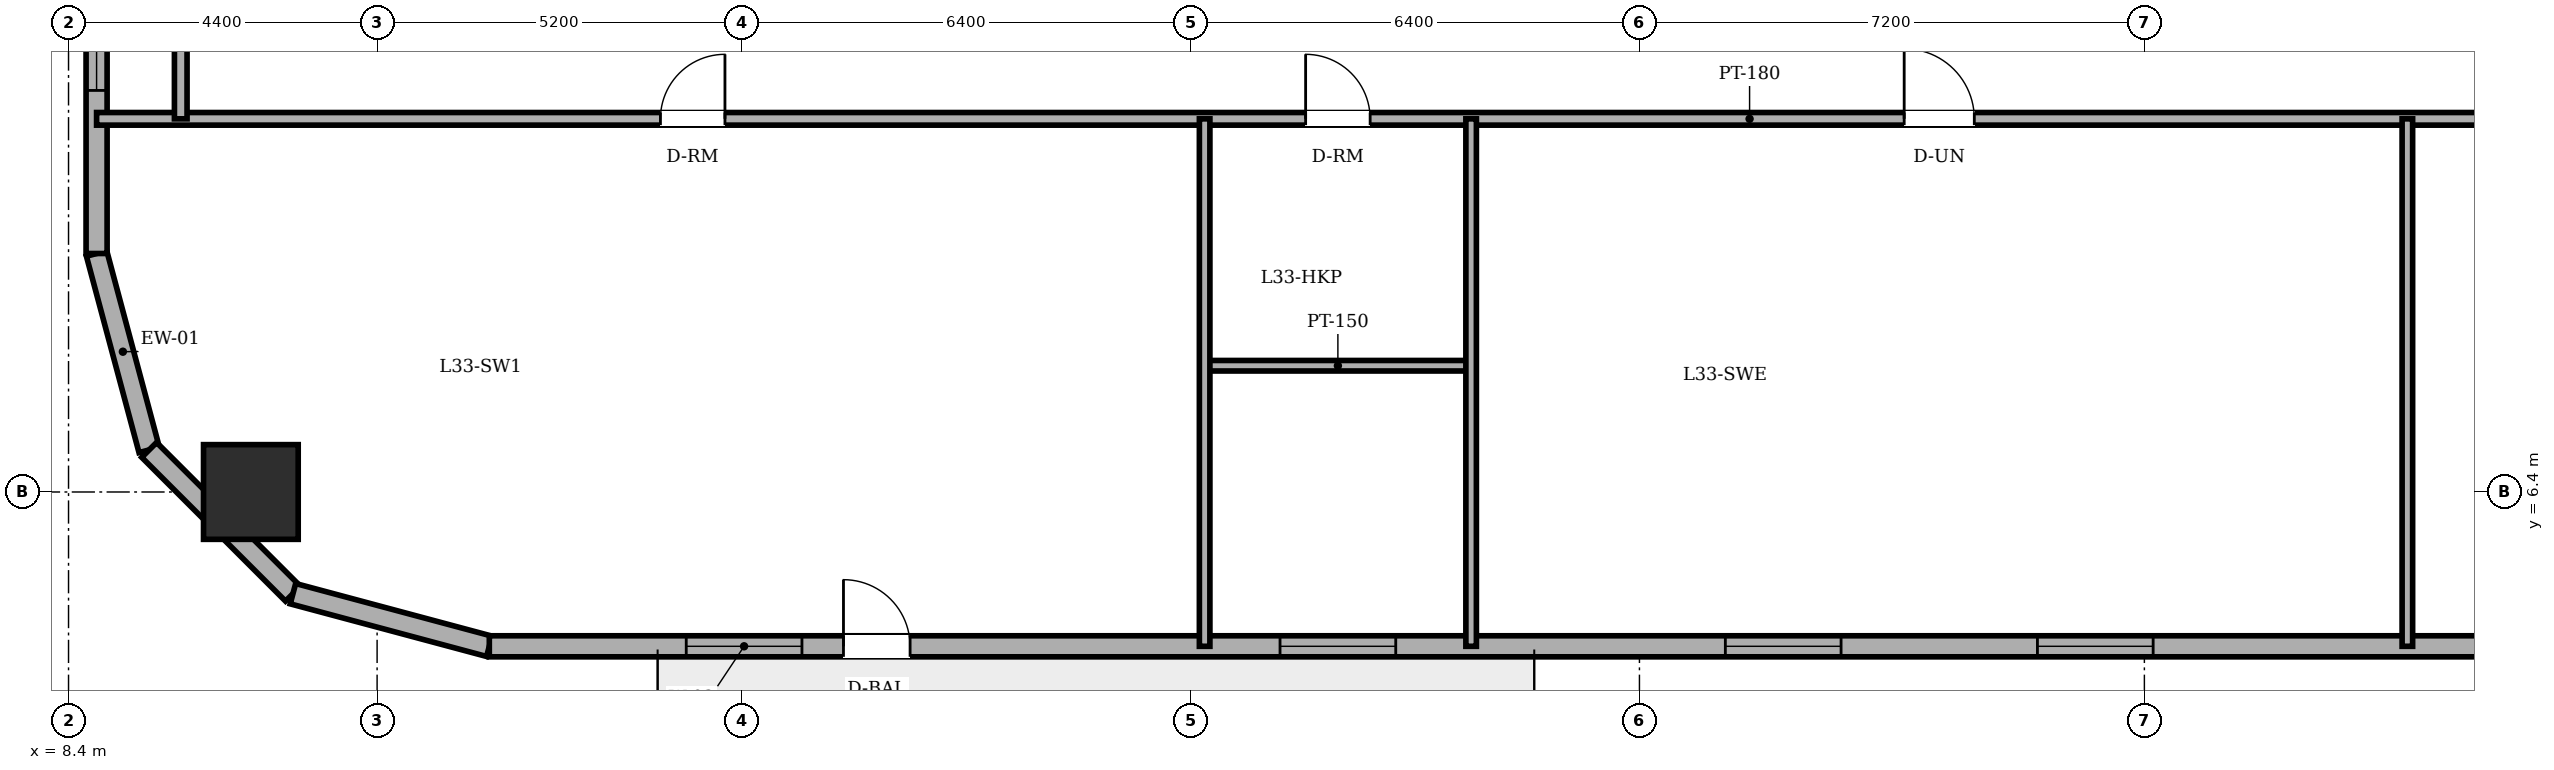
"""IFC4 building model, lengths in metres.
Left out: names, types, materials, properties, quantities, classifications, styles, units other than length and angle.
Written with IfcOpenShell. Run it as: python <this file> out.ifc"""

import sys

from ifc_helpers import new_model, si_unit, direction, frame, frame_2d, origin, origin_2d, place, context, subcontext, project, spatial, rectangle, circle, extrude, element, fill, save


model = new_model("IFC4")
c1 = context("Model", 3, precision=1e-05, world=origin(), true_north=direction((0.0, 1.0)))
c2 = subcontext(c1, "Body", "Model", "MODEL_VIEW")
j1 = project(units=[si_unit("LENGTHUNIT", "METRE"), si_unit("PLANEANGLEUNIT", "RADIAN")], contexts=[c1])
p1 = place(None, origin())
s1 = spatial("IfcSite", under=j1, at=p1, CompositionType="ELEMENT")
p2 = place(p1, origin())
s2 = spatial("IfcBuilding", under=s1, at=p2, CompositionType="ELEMENT")
p3 = place(p2, frame((0.0, 0.0, 125.9)))
s3 = spatial("IfcBuildingStorey", under=s2, at=p3, CompositionType="ELEMENT", Elevation=125.9)
p4 = place(p3, frame((11.0, 6.4, 0.0), z_axis=(0.0, 0.0, 1.0), x_axis=(1.0, 0.0, 0.0)))
e1 = element("IfcColumn", 1, at=p4, inside=s3, PredefinedType="COLUMN", context=c2, shape_type="SweptSolid", body=[
    extrude(circle(Radius=0.675, at=origin_2d()), origin(), (0.0, 0.0, 1.0), 3.6),
])
p5 = place(p3, frame((8.8, 9.8, 0.0), z_axis=(0.0, 0.0, 1.0), x_axis=(0.258731875344, -0.96594917914, 0.0)))
e2 = element("IfcWall", 2, at=p5, inside=s3, PredefinedType="SOLIDWALL", context=c2, shape_type="SweptSolid", body=[
    extrude(rectangle(XDim=2.899, YDim=0.3, at=frame_2d((1.449, 0.0))), origin(), (0.0, 0.0, 1.0), 3.4),
])
p6 = place(p3, frame((9.55, 7.0, 0.0), z_axis=(0.0, 0.0, 1.0), x_axis=(0.707106781187, -0.707106781187, 0.0)))
e3 = element("IfcWall", 3, at=p6, inside=s3, PredefinedType="SOLIDWALL", context=c2, shape_type="SweptSolid", body=[
    extrude(rectangle(XDim=2.899, YDim=0.3, at=frame_2d((1.45, 0.0))), origin(), (0.0, 0.0, 1.0), 3.4),
])
p7 = place(p3, frame((11.6, 4.95, 0.0), z_axis=(0.0, 0.0, 1.0), x_axis=(0.965943540406, -0.258752926066, 0.0)))
e4 = element("IfcWall", 4, at=p7, inside=s3, PredefinedType="SOLIDWALL", context=c2, shape_type="SweptSolid", body=[
    extrude(rectangle(XDim=2.898, YDim=0.3, at=frame_2d((1.449, 0.0))), origin(), (0.0, 0.0, 1.0), 3.4),
])
p8 = place(p3, frame((14.4, 4.2, 0.0), z_axis=(0.0, 0.0, 1.0), x_axis=(1.0, 0.0, 0.0)))
e5 = element("IfcWall", 5, at=p8, inside=s3, PredefinedType="SOLIDWALL", context=c2, shape_type="SweptSolid", body=[
    extrude(rectangle(XDim=29.933, YDim=0.3, at=frame_2d((14.967, 0.0))), origin(), (0.0, 0.0, 1.0), 3.4),
])
p9 = place(p8, frame((5.05, 0.0, 0.0)))
e6 = element("IfcOpeningElement", 6, at=p9, cuts=e5, PredefinedType="OPENING", context=c2, shape_type="SweptSolid", body=[
    extrude(rectangle(XDim=0.95, YDim=2.2, at=frame_2d((0.475, 1.1))), frame((0.0, 0.16, 0.0), z_axis=(0.0, -1.0, 0.0), x_axis=(1.0, 0.0, 0.0)), (0.0, 0.0, 1.0), 0.32),
])
p10 = place(p8, frame((2.808, 0.0, 0.85)))
e7 = element("IfcOpeningElement", 7, at=p10, cuts=e5, PredefinedType="OPENING", context=c2, shape_type="SweptSolid", body=[
    extrude(rectangle(XDim=1.65, YDim=1.55, at=frame_2d((0.825, 0.775))), frame((0.0, 0.16, 0.0), z_axis=(0.0, -1.0, 0.0), x_axis=(1.0, 0.0, 0.0)), (0.0, 0.0, 1.0), 0.32),
])
p11 = place(p8, frame((11.275, 0.0, 0.85)))
e8 = element("IfcOpeningElement", 8, at=p11, cuts=e5, PredefinedType="OPENING", context=c2, shape_type="SweptSolid", body=[
    extrude(rectangle(XDim=1.65, YDim=1.55, at=frame_2d((0.825, 0.775))), frame((0.0, 0.16, 0.0), z_axis=(0.0, -1.0, 0.0), x_axis=(1.0, 0.0, 0.0)), (0.0, 0.0, 1.0), 0.32),
])
p12 = place(p8, frame((17.625, 0.0, 0.85)))
e9 = element("IfcOpeningElement", 9, at=p12, cuts=e5, PredefinedType="OPENING", context=c2, shape_type="SweptSolid", body=[
    extrude(rectangle(XDim=1.65, YDim=1.55, at=frame_2d((0.825, 0.775))), frame((0.0, 0.16, 0.0), z_axis=(0.0, -1.0, 0.0), x_axis=(1.0, 0.0, 0.0)), (0.0, 0.0, 1.0), 0.32),
])
p13 = place(p8, frame((22.075, 0.0, 0.85)))
e10 = element("IfcOpeningElement", 10, at=p13, cuts=e5, PredefinedType="OPENING", context=c2, shape_type="SweptSolid", body=[
    extrude(rectangle(XDim=1.65, YDim=1.55, at=frame_2d((0.825, 0.775))), frame((0.0, 0.16, 0.0), z_axis=(0.0, -1.0, 0.0), x_axis=(1.0, 0.0, 0.0)), (0.0, 0.0, 1.0), 0.32),
])
p14 = place(p3, frame((8.8, 38.2, 0.0), z_axis=(0.0, 0.0, 1.0), x_axis=(0.0, -1.0, 0.0)))
e11 = element("IfcWall", 11, at=p14, inside=s3, PredefinedType="SOLIDWALL", context=c2, shape_type="SweptSolid", body=[
    extrude(rectangle(XDim=28.4, YDim=0.3, at=frame_2d((14.2, 0.0))), origin(), (0.0, 0.0, 1.0), 3.4),
])
p15 = place(p14, frame((2.325, 0.0, 0.85)))
e12 = element("IfcOpeningElement", 12, at=p15, cuts=e11, PredefinedType="OPENING", context=c2, shape_type="SweptSolid", body=[
    extrude(rectangle(XDim=1.65, YDim=1.55, at=frame_2d((0.825, 0.775))), frame((0.0, 0.16, 0.0), z_axis=(0.0, -1.0, 0.0), x_axis=(1.0, 0.0, 0.0)), (0.0, 0.0, 1.0), 0.32),
])
p16 = place(p14, frame((6.828, 0.0, 0.85)))
e13 = element("IfcOpeningElement", 13, at=p16, cuts=e11, PredefinedType="OPENING", context=c2, shape_type="SweptSolid", body=[
    extrude(rectangle(XDim=1.65, YDim=1.55, at=frame_2d((0.825, 0.775))), frame((0.0, 0.16, 0.0), z_axis=(0.0, -1.0, 0.0), x_axis=(1.0, 0.0, 0.0)), (0.0, 0.0, 1.0), 0.32),
])
p17 = place(p14, frame((10.102, 0.0, 0.85)))
e14 = element("IfcOpeningElement", 14, at=p17, cuts=e11, PredefinedType="OPENING", context=c2, shape_type="SweptSolid", body=[
    extrude(rectangle(XDim=1.65, YDim=1.55, at=frame_2d((0.825, 0.775))), frame((0.0, 0.16, 0.0), z_axis=(0.0, -1.0, 0.0), x_axis=(1.0, 0.0, 0.0)), (0.0, 0.0, 1.0), 0.32),
])
p18 = place(p14, frame((16.648, 0.0, 0.85)))
e15 = element("IfcOpeningElement", 15, at=p18, cuts=e11, PredefinedType="OPENING", context=c2, shape_type="SweptSolid", body=[
    extrude(rectangle(XDim=1.65, YDim=1.55, at=frame_2d((0.825, 0.775))), frame((0.0, 0.16, 0.0), z_axis=(0.0, -1.0, 0.0), x_axis=(1.0, 0.0, 0.0)), (0.0, 0.0, 1.0), 0.32),
])
p19 = place(p14, frame((19.922, 0.0, 0.85)))
e16 = element("IfcOpeningElement", 16, at=p19, cuts=e11, PredefinedType="OPENING", context=c2, shape_type="SweptSolid", body=[
    extrude(rectangle(XDim=1.65, YDim=1.55, at=frame_2d((0.825, 0.775))), frame((0.0, 0.16, 0.0), z_axis=(0.0, -1.0, 0.0), x_axis=(1.0, 0.0, 0.0)), (0.0, 0.0, 1.0), 0.32),
])
p20 = place(p14, frame((24.425, 0.0, 0.85)))
e17 = element("IfcOpeningElement", 17, at=p20, cuts=e11, PredefinedType="OPENING", context=c2, shape_type="SweptSolid", body=[
    extrude(rectangle(XDim=1.65, YDim=1.55, at=frame_2d((0.825, 0.775))), frame((0.0, 0.16, 0.0), z_axis=(0.0, -1.0, 0.0), x_axis=(1.0, 0.0, 0.0)), (0.0, 0.0, 1.0), 0.32),
])
p21 = place(p3, frame((24.6, 8.2, 0.0), z_axis=(0.0, 0.0, 1.0), x_axis=(1.0, 0.0, 0.0)))
e18 = element("IfcWall", 18, at=p21, inside=s3, PredefinedType="PARTITIONING", context=c2, shape_type="SweptSolid", body=[
    extrude(rectangle(XDim=3.8, YDim=0.15, at=frame_2d((1.9, 0.0))), origin(), (0.0, 0.0, 1.0), 3.4),
])
p22 = place(p3, frame((8.8, 11.72, 0.0), z_axis=(0.0, 0.0, 1.0), x_axis=(1.0, 0.0, 0.0)))
e19 = element("IfcWall", 19, at=p22, inside=s3, PredefinedType="PARTITIONING", context=c2, shape_type="SweptSolid", body=[
    extrude(rectangle(XDim=47.141, YDim=0.18, at=frame_2d((23.57, 0.0))), origin(), (0.0, 0.0, 1.0), 3.4),
])
p23 = place(p22, frame((17.24, 0.0, 0.0)))
e20 = element("IfcOpeningElement", 20, at=p23, cuts=e19, PredefinedType="OPENING", context=c2, shape_type="SweptSolid", body=[
    extrude(rectangle(XDim=0.92, YDim=2.1, at=frame_2d((0.46, 1.05))), frame((0.0, 0.1, 0.0), z_axis=(0.0, -1.0, 0.0), x_axis=(1.0, 0.0, 0.0)), (0.0, 0.0, 1.0), 0.2),
])
p24 = place(p22, frame((34.95, 0.0, 0.0)))
e21 = element("IfcOpeningElement", 21, at=p24, cuts=e19, PredefinedType="OPENING", context=c2, shape_type="SweptSolid", body=[
    extrude(rectangle(XDim=1.0, YDim=2.15, at=frame_2d((0.5, 1.075))), frame((0.0, 0.1, 0.0), z_axis=(0.0, -1.0, 0.0), x_axis=(1.0, 0.0, 0.0)), (0.0, 0.0, 1.0), 0.2),
])
p25 = place(p22, frame((8.04, 0.0, 0.0)))
e22 = element("IfcOpeningElement", 22, at=p25, cuts=e19, PredefinedType="OPENING", context=c2, shape_type="SweptSolid", body=[
    extrude(rectangle(XDim=0.92, YDim=2.1, at=frame_2d((0.46, 1.05))), frame((0.0, 0.1, 0.0), z_axis=(0.0, -1.0, 0.0), x_axis=(1.0, 0.0, 0.0)), (0.0, 0.0, 1.0), 0.2),
])
p26 = place(p22, frame((25.775, 0.0, 0.0)))
e23 = element("IfcOpeningElement", 23, at=p26, cuts=e19, PredefinedType="OPENING", context=c2, shape_type="SweptSolid", body=[
    extrude(rectangle(XDim=1.0, YDim=2.15, at=frame_2d((0.5, 1.075))), frame((0.0, 0.1, 0.0), z_axis=(0.0, -1.0, 0.0), x_axis=(1.0, 0.0, 0.0)), (0.0, 0.0, 1.0), 0.2),
])
p27 = place(p3, frame((10.0, 11.72, 0.0), z_axis=(0.0, 0.0, 1.0), x_axis=(0.0, 1.0, 0.0)))
e24 = element("IfcWall", 24, at=p27, inside=s3, PredefinedType="PARTITIONING", context=c2, shape_type="SweptSolid", body=[
    extrude(rectangle(XDim=2.46, YDim=0.18, at=frame_2d((1.23, 0.0))), origin(), (0.0, 0.0, 1.0), 3.4),
])
for number, where, z_axis, x_axis in (
    (25, (24.6, 4.2, 0.0), (0.0, 0.0, 1.0), (0.0, 1.0, 0.0)),
    (26, (28.4, 4.2, 0.0), (0.0, 0.0, 1.0), (0.0, 1.0, 0.0)),
    (27, (41.75, 4.2, 0.0), (0.0, 0.0, 1.0), (0.0, 1.0, 0.0)),
):
    element("IfcWall", number, at=place(p3, frame(where, z_axis=z_axis, x_axis=x_axis)), inside=s3, PredefinedType="PARTITIONING", context=c2, shape_type="SweptSolid", body=[
        extrude(rectangle(XDim=7.52, YDim=0.15, at=frame_2d((3.76, 0.0))), origin(), (0.0, 0.0, 1.0), 3.4),
    ])
p28 = place(p9, origin())
e28 = element("IfcDoor", 28, at=p28, inside=s3, OperationType="SINGLE_SWING_LEFT", PredefinedType="DOOR", context=c2, shape_type="SweptSolid", body=[
    extrude(rectangle(XDim=0.95, YDim=2.2, at=frame_2d((0.475, 1.1))), frame((0.0, 0.025, 0.0), z_axis=(0.0, -1.0, 0.0), x_axis=(1.0, 0.0, 0.0)), (0.0, 0.0, 1.0), 0.05),
])
fill(e6, e28)
p29 = place(p10, origin())
e29 = element("IfcWindow", 29, at=p29, inside=s3, PartitioningType="DOUBLE_PANEL_VERTICAL", PredefinedType="WINDOW", context=c2, shape_type="SweptSolid", body=[
    extrude(rectangle(XDim=1.65, YDim=1.55, at=frame_2d((0.825, 0.775))), frame((0.0, 0.03, 0.0), z_axis=(0.0, -1.0, 0.0), x_axis=(1.0, 0.0, 0.0)), (0.0, 0.0, 1.0), 0.06),
])
fill(e7, e29)
p30 = place(p11, origin())
e30 = element("IfcWindow", 30, at=p30, inside=s3, PartitioningType="DOUBLE_PANEL_VERTICAL", PredefinedType="WINDOW", context=c2, shape_type="SweptSolid", body=[
    extrude(rectangle(XDim=1.65, YDim=1.55, at=frame_2d((0.825, 0.775))), frame((0.0, 0.03, 0.0), z_axis=(0.0, -1.0, 0.0), x_axis=(1.0, 0.0, 0.0)), (0.0, 0.0, 1.0), 0.06),
])
fill(e8, e30)
p31 = place(p12, origin())
e31 = element("IfcWindow", 31, at=p31, inside=s3, PartitioningType="DOUBLE_PANEL_VERTICAL", PredefinedType="WINDOW", context=c2, shape_type="SweptSolid", body=[
    extrude(rectangle(XDim=1.65, YDim=1.55, at=frame_2d((0.825, 0.775))), frame((0.0, 0.03, 0.0), z_axis=(0.0, -1.0, 0.0), x_axis=(1.0, 0.0, 0.0)), (0.0, 0.0, 1.0), 0.06),
])
fill(e9, e31)
p32 = place(p13, origin())
e32 = element("IfcWindow", 32, at=p32, inside=s3, PartitioningType="DOUBLE_PANEL_VERTICAL", PredefinedType="WINDOW", context=c2, shape_type="SweptSolid", body=[
    extrude(rectangle(XDim=1.65, YDim=1.55, at=frame_2d((0.825, 0.775))), frame((0.0, 0.03, 0.0), z_axis=(0.0, -1.0, 0.0), x_axis=(1.0, 0.0, 0.0)), (0.0, 0.0, 1.0), 0.06),
])
fill(e10, e32)
p33 = place(p20, origin())
e33 = element("IfcWindow", 33, at=p33, inside=s3, PartitioningType="DOUBLE_PANEL_VERTICAL", PredefinedType="WINDOW", context=c2, shape_type="SweptSolid", body=[
    extrude(rectangle(XDim=1.65, YDim=1.55, at=frame_2d((0.825, 0.775))), frame((0.0, 0.03, 0.0), z_axis=(0.0, -1.0, 0.0), x_axis=(1.0, 0.0, 0.0)), (0.0, 0.0, 1.0), 0.06),
])
fill(e17, e33)
p34 = place(p23, origin())
e34 = element("IfcDoor", 34, at=p34, inside=s3, OperationType="SINGLE_SWING_LEFT", PredefinedType="DOOR", context=c2, shape_type="SweptSolid", body=[
    extrude(rectangle(XDim=0.92, YDim=2.1, at=frame_2d((0.46, 1.05))), frame((0.0, 0.025, 0.0), z_axis=(0.0, -1.0, 0.0), x_axis=(1.0, 0.0, 0.0)), (0.0, 0.0, 1.0), 0.05),
])
fill(e20, e34)
p35 = place(p25, origin())
e35 = element("IfcDoor", 35, at=p35, inside=s3, OperationType="SINGLE_SWING_RIGHT", PredefinedType="DOOR", context=c2, shape_type="SweptSolid", body=[
    extrude(rectangle(XDim=0.92, YDim=2.1, at=frame_2d((0.46, 1.05))), frame((0.0, 0.025, 0.0), z_axis=(0.0, -1.0, 0.0), x_axis=(1.0, 0.0, 0.0)), (0.0, 0.0, 1.0), 0.05),
])
fill(e22, e35)
p36 = place(p26, origin())
e36 = element("IfcDoor", 36, at=p36, inside=s3, OperationType="SINGLE_SWING_LEFT", PredefinedType="DOOR", context=c2, shape_type="SweptSolid", body=[
    extrude(rectangle(XDim=1.0, YDim=2.15, at=frame_2d((0.5, 1.075))), frame((0.0, 0.025, 0.0), z_axis=(0.0, -1.0, 0.0), x_axis=(1.0, 0.0, 0.0)), (0.0, 0.0, 1.0), 0.05),
])
fill(e23, e36)
save(model, sys.argv[1])
